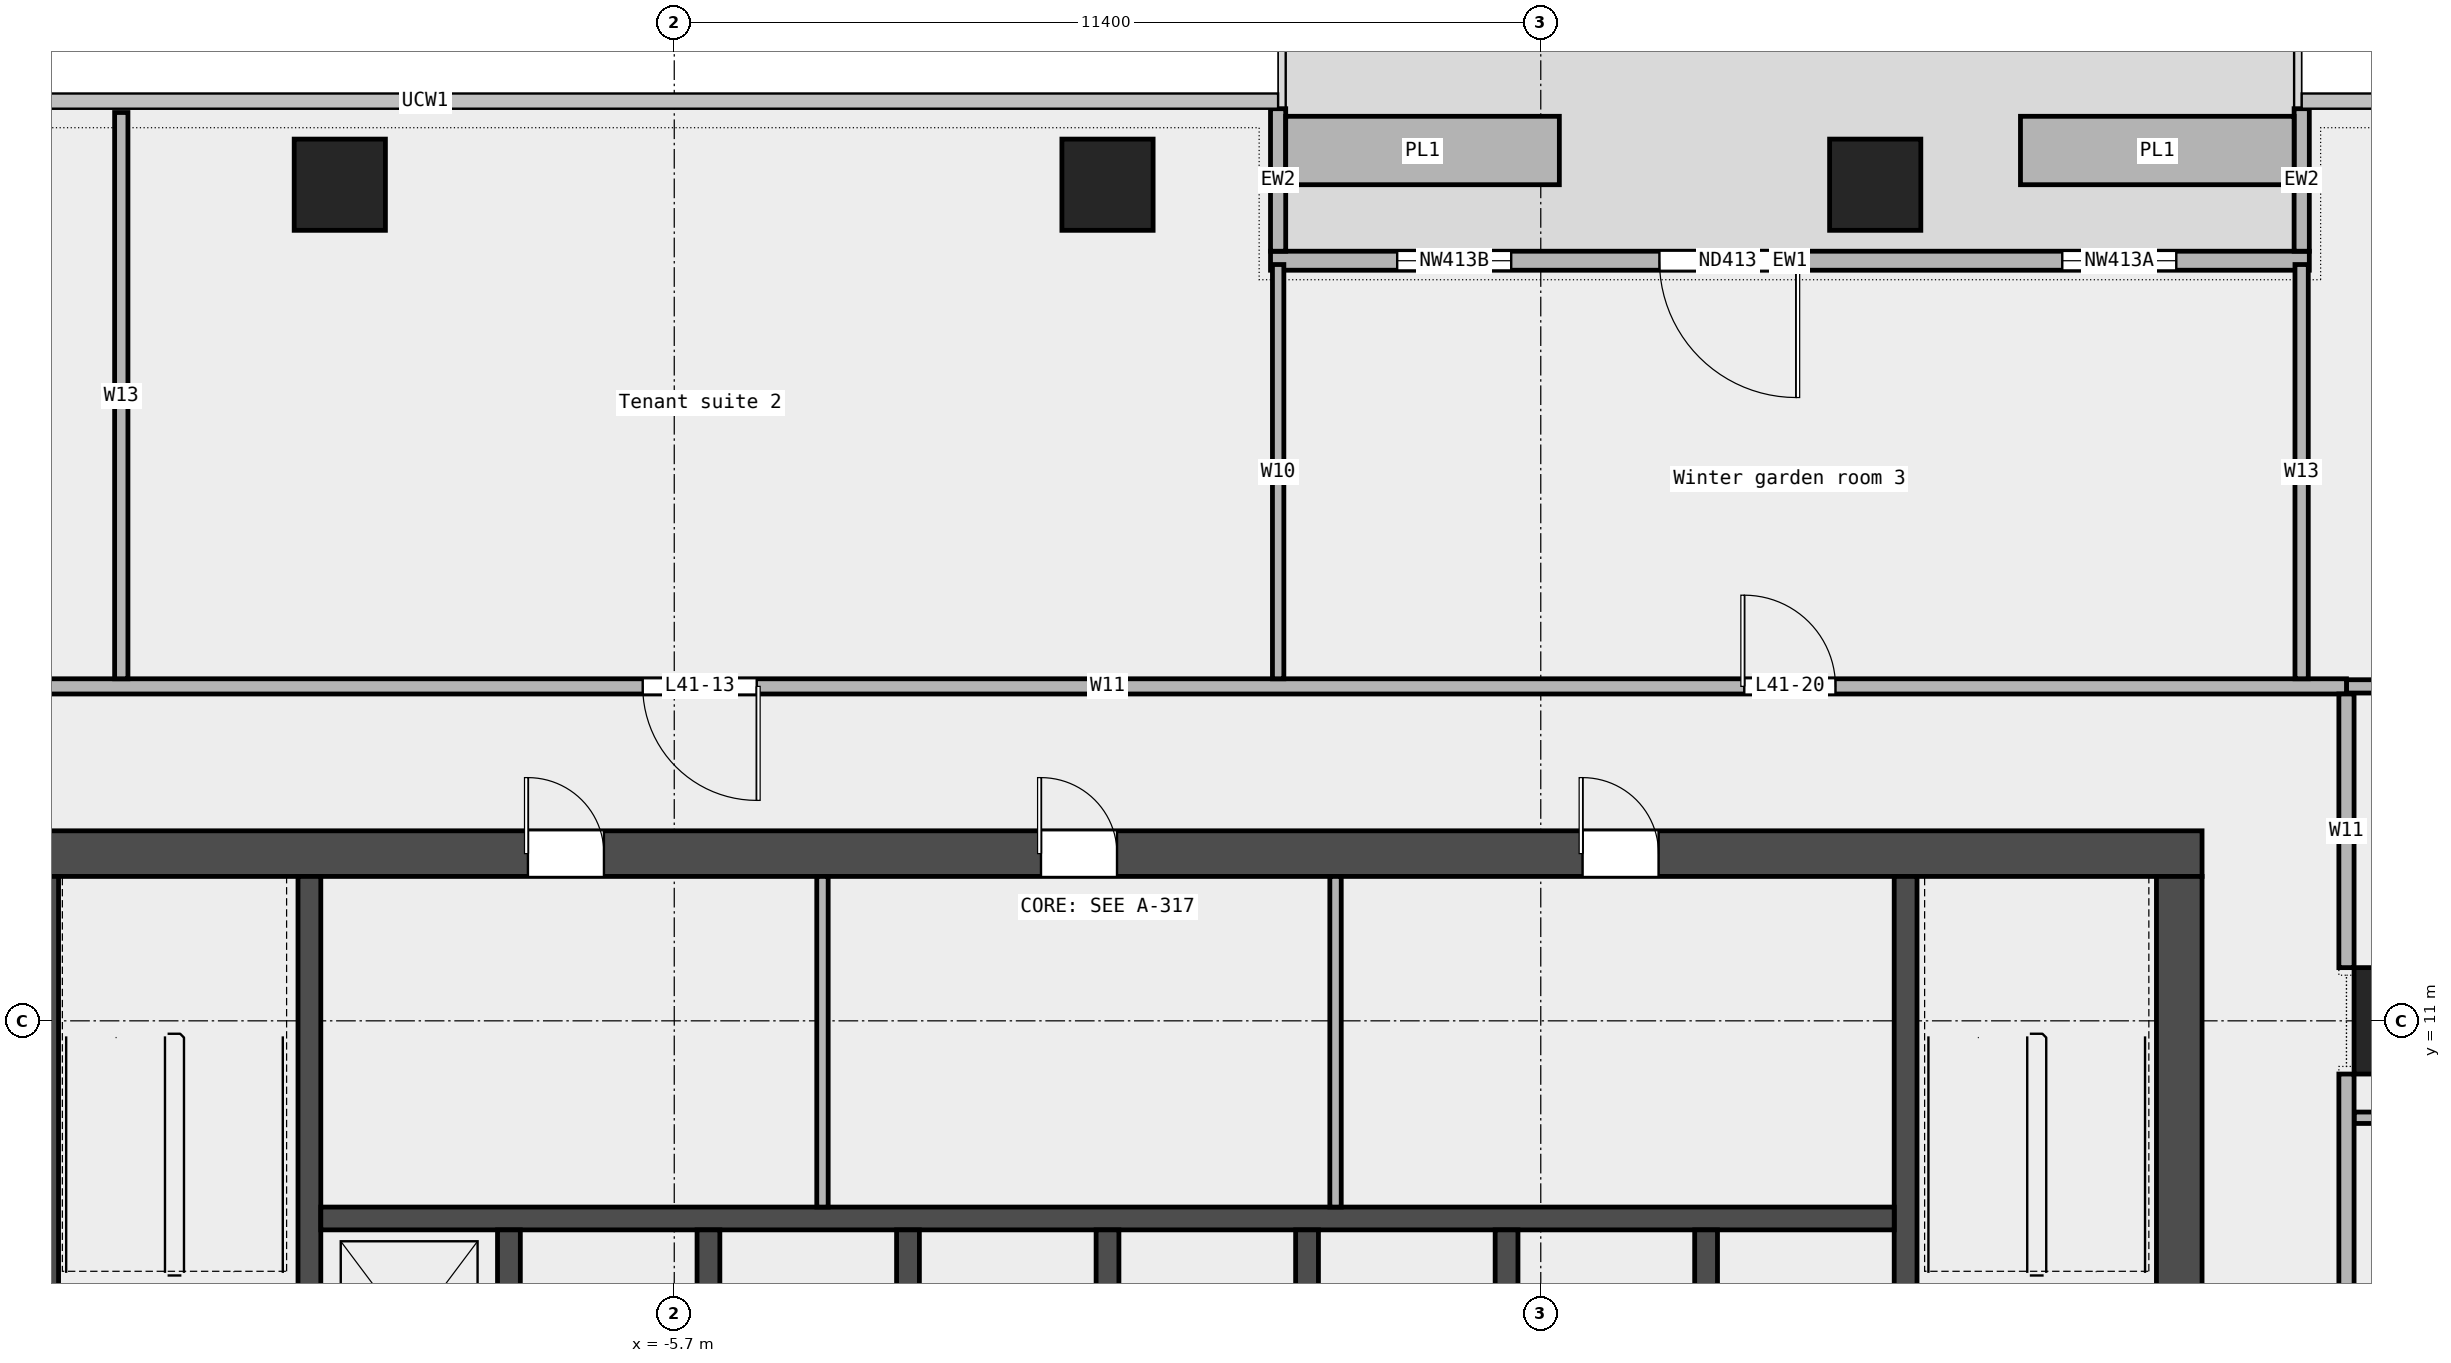
"""IFC4 building model, lengths in metres.
Left out: names, types, materials, properties, quantities, classifications, styles, units other than length and angle.
Written with IfcOpenShell. Run it as: python <this file> out.ifc"""

import sys

from ifc_helpers import new_model, si_unit, direction, frame, frame_2d, origin, origin_2d, place, context, subcontext, project, spatial, rectangle, extrude, element, fill, save


model = new_model("IFC4")
c1 = context("Model", 3, precision=1e-05, world=origin(), true_north=direction((0.0, 1.0)))
c2 = subcontext(c1, "Body", "Model", "MODEL_VIEW")
j1 = project(units=[si_unit("LENGTHUNIT", "METRE"), si_unit("PLANEANGLEUNIT", "RADIAN")], contexts=[c1])
p1 = place(None, origin())
s1 = spatial("IfcSite", under=j1, at=p1, CompositionType="ELEMENT")
p2 = place(p1, origin())
s2 = spatial("IfcBuilding", under=s1, at=p2, CompositionType="ELEMENT")
p3 = place(p2, frame((0.0, 0.0, 197.0)))
s3 = spatial("IfcBuildingStorey", under=s2, at=p3, CompositionType="ELEMENT", Elevation=197.0)
for number, where, z_axis, x_axis in (
    (1, (10.1, 22.0, 0.0), (0.0, 0.0, 1.0), (1.0, 0.0, 0.0)),
    (2, (0.0, 22.0, 0.0), (0.0, 0.0, 1.0), (1.0, 0.0, 0.0)),
    (3, (-10.1, 22.0, 0.0), (0.0, 0.0, 1.0), (1.0, 0.0, 0.0)),
):
    element("IfcColumn", number, at=place(p3, frame(where, z_axis=z_axis, x_axis=x_axis)), inside=s3, PredefinedType="COLUMN", context=c2, shape_type="SweptSolid", body=[
        extrude(rectangle(XDim=1.2, YDim=1.2, at=origin_2d()), origin(), (0.0, 0.0, 1.0), 3.6),
    ])
p4 = place(p3, frame((17.1, 11.0, 0.0), z_axis=(0.0, 0.0, 1.0), x_axis=(1.0, 0.0, 0.0)))
e4 = element("IfcColumn", 4, at=p4, inside=s3, PredefinedType="COLUMN", context=c2, shape_type="SweptSolid", body=[
    extrude(rectangle(XDim=1.4, YDim=1.4, at=origin_2d()), origin(), (0.0, 0.0, 1.0), 3.6),
])
p5 = place(p3, frame((15.811, 21.0, 0.0), z_axis=(0.0, 0.0, 1.0), x_axis=(-1.0, 0.0, 0.0)))
e5 = element("IfcWall", 5, at=p5, inside=s3, PredefinedType="STANDARD", context=c2, shape_type="SweptSolid", body=[
    extrude(rectangle(XDim=13.667, YDim=0.25, at=frame_2d((6.833, 0.0))), origin(), (0.0, 0.0, 1.0), 3.6),
])
p6 = place(p5, frame((1.75, 0.0, 0.45)))
e6 = element("IfcOpeningElement", 6, at=p6, cuts=e5, PredefinedType="OPENING", context=c2, shape_type="SweptSolid", body=[
    extrude(rectangle(XDim=1.5, YDim=2.4, at=frame_2d((0.75, 1.2))), frame((0.0, 0.137, 0.0), z_axis=(0.0, -1.0, 0.0), x_axis=(1.0, 0.0, 0.0)), (0.0, 0.0, 1.0), 0.274),
])
p7 = place(p5, frame((6.75, 0.0, 0.0)))
e7 = element("IfcOpeningElement", 7, at=p7, cuts=e5, PredefinedType="OPENING", context=c2, shape_type="SweptSolid", body=[
    extrude(rectangle(XDim=1.8, YDim=2.4, at=frame_2d((0.9, 1.2))), frame((0.0, 0.137, 0.0), z_axis=(0.0, -1.0, 0.0), x_axis=(1.0, 0.0, 0.0)), (0.0, 0.0, 1.0), 0.274),
])
p8 = place(p5, frame((10.5, 0.0, 0.45)))
e8 = element("IfcOpeningElement", 8, at=p8, cuts=e5, PredefinedType="OPENING", context=c2, shape_type="SweptSolid", body=[
    extrude(rectangle(XDim=1.5, YDim=2.4, at=frame_2d((0.75, 1.2))), frame((0.0, 0.137, 0.0), z_axis=(0.0, -1.0, 0.0), x_axis=(1.0, 0.0, 0.0)), (0.0, 0.0, 1.0), 0.274),
])
for number, where, z_axis, x_axis in (
    (9, (15.711, 23.0, 0.0), (0.0, 0.0, 1.0), (0.0, -1.0, 0.0)),
    (10, (2.244, 23.0, 0.0), (0.0, 0.0, 1.0), (0.0, -1.0, 0.0)),
):
    element("IfcWall", number, at=place(p3, frame(where, z_axis=z_axis, x_axis=x_axis)), inside=s3, PredefinedType="STANDARD", context=c2, shape_type="SweptSolid", body=[
        extrude(rectangle(XDim=1.875, YDim=0.2, at=frame_2d((0.938, 0.0))), origin(), (0.0, 0.0, 1.0), 3.6),
    ])
for number, where, z_axis, x_axis in (
    (11, (15.611, 22.45, 0.0), (0.0, 0.0, 1.0), (-1.0, 0.0, 0.0)),
    (12, (5.944, 22.45, 0.0), (0.0, 0.0, 1.0), (-1.0, 0.0, 0.0)),
):
    element("IfcWall", number, at=place(p3, frame(where, z_axis=z_axis, x_axis=x_axis)), inside=s3, PredefinedType="STANDARD", context=c2, shape_type="SweptSolid", body=[
        extrude(rectangle(XDim=3.6, YDim=0.9, at=frame_2d((1.8, 0.0))), origin(), (0.0, 0.0, 1.0), 0.7),
    ])
p9 = place(p3, frame((16.4, 9.725, 0.0), z_axis=(0.0, 0.0, 1.0), x_axis=(1.0, 0.0, 0.0)))
e13 = element("IfcWall", 13, at=p9, inside=s3, PredefinedType="PARTITIONING", context=c2, shape_type="SweptSolid", body=[
    extrude(rectangle(XDim=3.4, YDim=0.15, at=frame_2d((1.7, 0.0))), origin(), (0.0, 0.0, 1.0), 3.6),
])
p10 = place(p3, frame((16.3, 15.4, 0.0), z_axis=(0.0, 0.0, 1.0), x_axis=(1.0, 0.0, 0.0)))
e14 = element("IfcWall", 14, at=p10, inside=s3, PredefinedType="PARTITIONING", context=c2, shape_type="SweptSolid", body=[
    extrude(rectangle(XDim=3.6, YDim=0.175, at=frame_2d((1.8, 0.0))), origin(), (0.0, 0.0, 1.0), 3.6),
])
p11 = place(p3, frame((-16.3, 15.4, 0.0), z_axis=(0.0, 0.0, 1.0), x_axis=(1.0, 0.0, 0.0)))
e15 = element("IfcWall", 15, at=p11, inside=s3, PredefinedType="PARTITIONING", context=c2, shape_type="SweptSolid", body=[
    extrude(rectangle(XDim=32.6, YDim=0.2, at=frame_2d((16.3, 0.0))), origin(), (0.0, 0.0, 1.0), 3.6),
])
p12 = place(p11, frame((10.185, 0.0, 0.0)))
e16 = element("IfcOpeningElement", 16, at=p12, cuts=e15, PredefinedType="OPENING", context=c2, shape_type="SweptSolid", body=[
    extrude(rectangle(XDim=1.5, YDim=2.1, at=frame_2d((0.75, 1.05))), frame((0.0, 0.112, 0.0), z_axis=(0.0, -1.0, 0.0), x_axis=(1.0, 0.0, 0.0)), (0.0, 0.0, 1.0), 0.224),
])
p13 = place(p11, frame((1.062, 0.0, 0.0)))
e17 = element("IfcOpeningElement", 17, at=p13, cuts=e15, PredefinedType="OPENING", context=c2, shape_type="SweptSolid", body=[
    extrude(rectangle(XDim=1.2, YDim=2.1, at=frame_2d((0.6, 1.05))), frame((0.0, 0.112, 0.0), z_axis=(0.0, -1.0, 0.0), x_axis=(1.0, 0.0, 0.0)), (0.0, 0.0, 1.0), 0.224),
])
p14 = place(p11, frame((24.677, 0.0, 0.0)))
e18 = element("IfcOpeningElement", 18, at=p14, cuts=e15, PredefinedType="OPENING", context=c2, shape_type="SweptSolid", body=[
    extrude(rectangle(XDim=1.2, YDim=2.1, at=frame_2d((0.6, 1.05))), frame((0.0, 0.112, 0.0), z_axis=(0.0, -1.0, 0.0), x_axis=(1.0, 0.0, 0.0)), (0.0, 0.0, 1.0), 0.224),
])
p15 = place(p3, frame((-12.975, 15.5, 0.0), z_axis=(0.0, 0.0, 1.0), x_axis=(0.0, 1.0, 0.0)))
e19 = element("IfcWall", 19, at=p15, inside=s3, PredefinedType="PARTITIONING", context=c2, shape_type="SweptSolid", body=[
    extrude(rectangle(XDim=7.45, YDim=0.175, at=frame_2d((3.725, 0.0))), origin(), (0.0, 0.0, 1.0), 3.6),
])
p16 = place(p3, frame((2.245, 15.5, 0.0), z_axis=(0.0, 0.0, 1.0), x_axis=(0.0, 1.0, 0.0)))
e20 = element("IfcWall", 20, at=p16, inside=s3, PredefinedType="PARTITIONING", context=c2, shape_type="SweptSolid", body=[
    extrude(rectangle(XDim=5.45, YDim=0.15, at=frame_2d((2.725, 0.0))), origin(), (0.0, 0.0, 1.0), 3.6),
])
p17 = place(p3, frame((15.71, 15.5, 0.0), z_axis=(0.0, 0.0, 1.0), x_axis=(0.0, 1.0, 0.0)))
e21 = element("IfcWall", 21, at=p17, inside=s3, PredefinedType="PARTITIONING", context=c2, shape_type="SweptSolid", body=[
    extrude(rectangle(XDim=5.45, YDim=0.175, at=frame_2d((2.725, 0.0))), origin(), (0.0, 0.0, 1.0), 3.6),
])
p18 = place(p3, frame((16.3, 4.15, 0.0), z_axis=(0.0, 0.0, 1.0), x_axis=(0.0, 1.0, 0.0)))
e22 = element("IfcWall", 22, at=p18, inside=s3, PredefinedType="PARTITIONING", context=c2, shape_type="SweptSolid", body=[
    extrude(rectangle(XDim=6.15, YDim=0.2, at=frame_2d((3.075, 0.0))), origin(), (0.0, 0.0, 1.0), 3.6),
])
p19 = place(p3, frame((16.3, 11.7, 0.0), z_axis=(0.0, 0.0, 1.0), x_axis=(0.0, 1.0, 0.0)))
e23 = element("IfcWall", 23, at=p19, inside=s3, PredefinedType="PARTITIONING", context=c2, shape_type="SweptSolid", body=[
    extrude(rectangle(XDim=3.6, YDim=0.2, at=frame_2d((1.8, 0.0))), origin(), (0.0, 0.0, 1.0), 3.6),
])
p20 = place(p3, frame((-14.4, 13.2, 0.0), z_axis=(0.0, 0.0, 1.0), x_axis=(1.0, 0.0, 0.0)))
e24 = element("IfcWall", 24, at=p20, inside=s3, PredefinedType="SHEAR", context=c2, shape_type="SweptSolid", body=[
    extrude(rectangle(XDim=28.8, YDim=0.6, at=frame_2d((14.4, 0.0))), origin(), (0.0, 0.0, 1.0), 3.7),
])
p21 = place(p20, frame((6.775, 0.0, 0.0)))
e25 = element("IfcOpeningElement", 25, at=p21, cuts=e24, PredefinedType="OPENING", context=c2, shape_type="SweptSolid", body=[
    extrude(rectangle(XDim=1.0, YDim=2.1, at=frame_2d((0.5, 1.05))), frame((0.0, 0.312, 0.0), z_axis=(0.0, -1.0, 0.0), x_axis=(1.0, 0.0, 0.0)), (0.0, 0.0, 1.0), 0.624),
])
p22 = place(p20, frame((13.525, 0.0, 0.0)))
e26 = element("IfcOpeningElement", 26, at=p22, cuts=e24, PredefinedType="OPENING", context=c2, shape_type="SweptSolid", body=[
    extrude(rectangle(XDim=1.0, YDim=2.1, at=frame_2d((0.5, 1.05))), frame((0.0, 0.312, 0.0), z_axis=(0.0, -1.0, 0.0), x_axis=(1.0, 0.0, 0.0)), (0.0, 0.0, 1.0), 0.624),
])
p23 = place(p20, frame((20.65, 0.0, 0.0)))
e27 = element("IfcOpeningElement", 27, at=p23, cuts=e24, PredefinedType="OPENING", context=c2, shape_type="SweptSolid", body=[
    extrude(rectangle(XDim=1.0, YDim=2.1, at=frame_2d((0.5, 1.05))), frame((0.0, 0.312, 0.0), z_axis=(0.0, -1.0, 0.0), x_axis=(1.0, 0.0, 0.0)), (0.0, 0.0, 1.0), 0.624),
])
p24 = place(p3, frame((-14.1, -6.6, 0.0), z_axis=(0.0, 0.0, 1.0), x_axis=(0.0, 1.0, 0.0)))
e28 = element("IfcWall", 28, at=p24, inside=s3, PredefinedType="SHEAR", context=c2, shape_type="SweptSolid", body=[
    extrude(rectangle(XDim=19.5, YDim=0.6, at=frame_2d((9.75, 0.0))), origin(), (0.0, 0.0, 1.0), 3.7),
])
p25 = place(p24, frame((9.3, 0.0, 0.0)))
e29 = element("IfcOpeningElement", 29, at=p25, cuts=e28, PredefinedType="OPENING", context=c2, shape_type="SweptSolid", body=[
    extrude(rectangle(XDim=1.8, YDim=2.1, at=frame_2d((0.9, 1.05))), frame((0.0, 0.312, 0.0), z_axis=(0.0, -1.0, 0.0), x_axis=(1.0, 0.0, 0.0)), (0.0, 0.0, 1.0), 0.624),
])
p26 = place(p3, frame((14.1, -6.6, 0.0), z_axis=(0.0, 0.0, 1.0), x_axis=(0.0, 1.0, 0.0)))
e30 = element("IfcWall", 30, at=p26, inside=s3, PredefinedType="SHEAR", context=c2, shape_type="SweptSolid", body=[
    extrude(rectangle(XDim=19.5, YDim=0.6, at=frame_2d((9.75, 0.0))), origin(), (0.0, 0.0, 1.0), 3.7),
])
p27 = place(p26, frame((9.3, 0.0, 0.0)))
e31 = element("IfcOpeningElement", 31, at=p27, cuts=e30, PredefinedType="OPENING", context=c2, shape_type="SweptSolid", body=[
    extrude(rectangle(XDim=1.8, YDim=2.1, at=frame_2d((0.9, 1.05))), frame((0.0, 0.312, 0.0), z_axis=(0.0, -1.0, 0.0), x_axis=(1.0, 0.0, 0.0)), (0.0, 0.0, 1.0), 0.624),
])
for number, where, z_axis, x_axis in (
    (32, (-10.5, 5.25, 0.0), (0.0, 0.0, 1.0), (0.0, 1.0, 0.0)),
    (33, (10.5, 5.25, 0.0), (0.0, 0.0, 1.0), (0.0, 1.0, 0.0)),
):
    element("IfcWall", number, at=place(p3, frame(where, z_axis=z_axis, x_axis=x_axis)), inside=s3, PredefinedType="SHEAR", context=c2, shape_type="SweptSolid", body=[
        extrude(rectangle(XDim=7.65, YDim=0.3, at=frame_2d((3.825, 0.0))), origin(), (0.0, 0.0, 1.0), 3.7),
    ])
p28 = place(p3, frame((-10.35, 8.4, 0.0), z_axis=(0.0, 0.0, 1.0), x_axis=(1.0, 0.0, 0.0)))
e34 = element("IfcWall", 34, at=p28, inside=s3, PredefinedType="SOLIDWALL", context=c2, shape_type="SweptSolid", body=[
    extrude(rectangle(XDim=20.7, YDim=0.3, at=frame_2d((10.35, 0.0))), origin(), (0.0, 0.0, 1.0), 3.7),
])
for number, where, z_axis, x_axis in (
    (35, (-7.875, 5.55, 0.0), (0.0, 0.0, 1.0), (0.0, 1.0, 0.0)),
    (36, (-5.25, 5.55, 0.0), (0.0, 0.0, 1.0), (0.0, 1.0, 0.0)),
    (37, (-2.625, 5.55, 0.0), (0.0, 0.0, 1.0), (0.0, 1.0, 0.0)),
    (38, (0.0, 5.55, 0.0), (0.0, 0.0, 1.0), (0.0, 1.0, 0.0)),
    (39, (2.625, 5.55, 0.0), (0.0, 0.0, 1.0), (0.0, 1.0, 0.0)),
    (40, (5.25, 5.55, 0.0), (0.0, 0.0, 1.0), (0.0, 1.0, 0.0)),
    (41, (7.875, 5.55, 0.0), (0.0, 0.0, 1.0), (0.0, 1.0, 0.0)),
):
    element("IfcWall", number, at=place(p3, frame(where, z_axis=z_axis, x_axis=x_axis)), inside=s3, PredefinedType="SOLIDWALL", context=c2, shape_type="SweptSolid", body=[
        extrude(rectangle(XDim=2.7, YDim=0.3, at=frame_2d((1.35, 0.0))), origin(), (0.0, 0.0, 1.0), 3.7),
    ])
for number, where, z_axis, x_axis in (
    (42, (-3.75, 8.55, 0.0), (0.0, 0.0, 1.0), (0.0, 1.0, 0.0)),
    (43, (3.0, 8.55, 0.0), (0.0, 0.0, 1.0), (0.0, 1.0, 0.0)),
):
    element("IfcWall", number, at=place(p3, frame(where, z_axis=z_axis, x_axis=x_axis)), inside=s3, PredefinedType="PARTITIONING", context=c2, shape_type="SweptSolid", body=[
        extrude(rectangle(XDim=4.35, YDim=0.15, at=frame_2d((2.175, 0.0))), origin(), (0.0, 0.0, 1.0), 3.7),
    ])
p29 = place(p6, origin())
e44 = element("IfcWindow", 44, at=p29, inside=s3, PartitioningType="SINGLE_PANEL", PredefinedType="WINDOW", context=c2, shape_type="SweptSolid", body=[
    extrude(rectangle(XDim=1.5, YDim=2.4, at=frame_2d((0.75, 1.2))), frame((0.0, 0.03, 0.0), z_axis=(0.0, -1.0, 0.0), x_axis=(1.0, 0.0, 0.0)), (0.0, 0.0, 1.0), 0.06),
])
fill(e6, e44)
p30 = place(p7, origin())
e45 = element("IfcDoor", 45, at=p30, inside=s3, OperationType="DOUBLE_DOOR_SINGLE_SWING", PredefinedType="DOOR", context=c2, shape_type="SweptSolid", body=[
    extrude(rectangle(XDim=1.8, YDim=2.4, at=frame_2d((0.9, 1.2))), frame((0.0, 0.025, 0.0), z_axis=(0.0, -1.0, 0.0), x_axis=(1.0, 0.0, 0.0)), (0.0, 0.0, 1.0), 0.05),
])
fill(e7, e45)
p31 = place(p8, origin())
e46 = element("IfcWindow", 46, at=p31, inside=s3, PartitioningType="SINGLE_PANEL", PredefinedType="WINDOW", context=c2, shape_type="SweptSolid", body=[
    extrude(rectangle(XDim=1.5, YDim=2.4, at=frame_2d((0.75, 1.2))), frame((0.0, 0.03, 0.0), z_axis=(0.0, -1.0, 0.0), x_axis=(1.0, 0.0, 0.0)), (0.0, 0.0, 1.0), 0.06),
])
fill(e8, e46)
p32 = place(p12, origin())
e47 = element("IfcDoor", 47, at=p32, inside=s3, OperationType="DOUBLE_DOOR_SINGLE_SWING", PredefinedType="DOOR", context=c2, shape_type="SweptSolid", body=[
    extrude(rectangle(XDim=1.5, YDim=2.1, at=frame_2d((0.75, 1.05))), frame((0.0, 0.025, 0.0), z_axis=(0.0, -1.0, 0.0), x_axis=(1.0, 0.0, 0.0)), (0.0, 0.0, 1.0), 0.05),
])
fill(e16, e47)
p33 = place(p14, origin())
e48 = element("IfcDoor", 48, at=p33, inside=s3, OperationType="SINGLE_SWING_LEFT", PredefinedType="DOOR", context=c2, shape_type="SweptSolid", body=[
    extrude(rectangle(XDim=1.2, YDim=2.1, at=frame_2d((0.6, 1.05))), frame((0.0, 0.025, 0.0), z_axis=(0.0, -1.0, 0.0), x_axis=(1.0, 0.0, 0.0)), (0.0, 0.0, 1.0), 0.05),
])
fill(e18, e48)
p34 = place(p21, origin())
e49 = element("IfcDoor", 49, at=p34, inside=s3, OperationType="SINGLE_SWING_LEFT", PredefinedType="DOOR", context=c2, shape_type="SweptSolid", body=[
    extrude(rectangle(XDim=1.0, YDim=2.1, at=frame_2d((0.5, 1.05))), frame((0.0, 0.025, 0.0), z_axis=(0.0, -1.0, 0.0), x_axis=(1.0, 0.0, 0.0)), (0.0, 0.0, 1.0), 0.05),
])
fill(e25, e49)
p35 = place(p22, origin())
e50 = element("IfcDoor", 50, at=p35, inside=s3, OperationType="SINGLE_SWING_LEFT", PredefinedType="DOOR", context=c2, shape_type="SweptSolid", body=[
    extrude(rectangle(XDim=1.0, YDim=2.1, at=frame_2d((0.5, 1.05))), frame((0.0, 0.025, 0.0), z_axis=(0.0, -1.0, 0.0), x_axis=(1.0, 0.0, 0.0)), (0.0, 0.0, 1.0), 0.05),
])
fill(e26, e50)
p36 = place(p23, origin())
e51 = element("IfcDoor", 51, at=p36, inside=s3, OperationType="SINGLE_SWING_LEFT", PredefinedType="DOOR", context=c2, shape_type="SweptSolid", body=[
    extrude(rectangle(XDim=1.0, YDim=2.1, at=frame_2d((0.5, 1.05))), frame((0.0, 0.025, 0.0), z_axis=(0.0, -1.0, 0.0), x_axis=(1.0, 0.0, 0.0)), (0.0, 0.0, 1.0), 0.05),
])
fill(e27, e51)
save(model, sys.argv[1])
